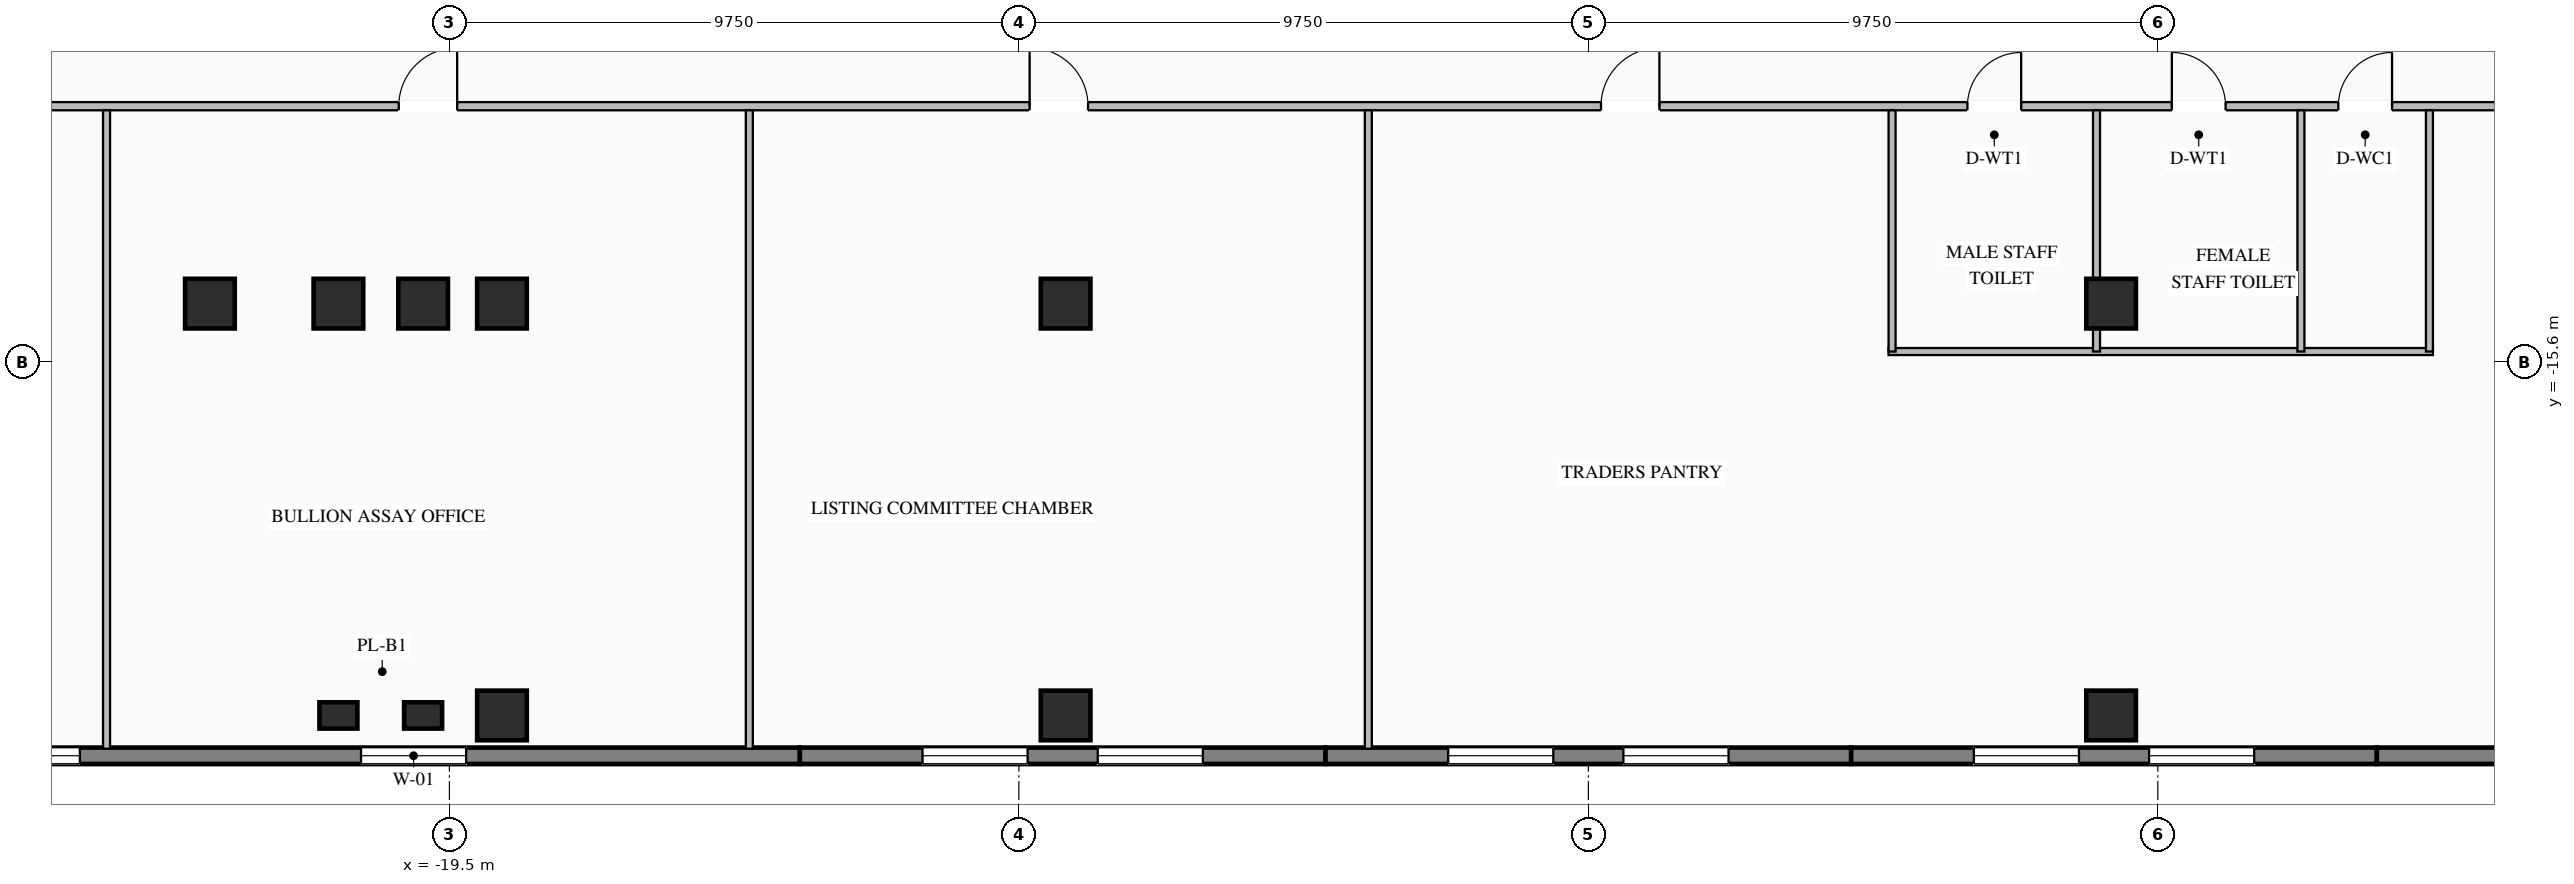
"""IFC4 building model, lengths in metres.
Left out: names, types, materials, properties, quantities, classifications, styles, units other than length and angle.
Written with IfcOpenShell. Run it as: python <this file> out.ifc"""

import sys

from ifc_helpers import new_model, si_unit, direction, frame, frame_2d, origin, origin_2d, place, context, subcontext, project, spatial, rectangle, i_section, extrude, element, fill, save


model = new_model("IFC4")
c1 = context("Model", 3, precision=1e-05, world=origin(), true_north=direction((0.0, 1.0)))
c2 = subcontext(c1, "Body", "Model", "MODEL_VIEW")
j1 = project(units=[si_unit("LENGTHUNIT", "METRE"), si_unit("PLANEANGLEUNIT", "RADIAN")], contexts=[c1])
p1 = place(None, origin())
s1 = spatial("IfcSite", under=j1, at=p1, CompositionType="ELEMENT")
p2 = place(p1, origin())
s2 = spatial("IfcBuilding", under=s1, at=p2, CompositionType="ELEMENT")
p3 = place(p2, frame((0.0, 0.0, 41.55)))
s3 = spatial("IfcBuildingStorey", under=s2, at=p3, CompositionType="ELEMENT", Elevation=41.55)
for number, where, z_axis, x_axis in (
    (1, (-21.4, -14.6, 0.0), (0.0, 0.0, 1.0), (1.0, 0.0, 0.0)),
    (2, (-19.95, -14.6, 0.0), (0.0, 0.0, 1.0), (1.0, 0.0, 0.0)),
    (3, (-18.6, -14.6, 0.0), (0.0, 0.0, 1.0), (1.0, 0.0, 0.0)),
    (4, (-8.95, -14.6, 0.0), (0.0, 0.0, 1.0), (1.0, 0.0, 0.0)),
    (5, (8.95, -14.6, 0.0), (0.0, 0.0, 1.0), (1.0, 0.0, 0.0)),
    (6, (-23.6, -14.6, 0.0), (0.0, 0.0, 1.0), (1.0, 0.0, 0.0)),
    (7, (-18.6, -21.65, 0.0), (0.0, 0.0, 1.0), (1.0, 0.0, 0.0)),
    (8, (-8.95, -21.65, 0.0), (0.0, 0.0, 1.0), (1.0, 0.0, 0.0)),
    (9, (8.95, -21.65, 0.0), (0.0, 0.0, 1.0), (1.0, 0.0, 0.0)),
):
    element("IfcColumn", number, at=place(p3, frame(where, z_axis=z_axis, x_axis=x_axis)), inside=s3, PredefinedType="COLUMN", context=c2, shape_type="SweptSolid", body=[
        extrude(i_section(OverallWidth=0.85, OverallDepth=0.85, WebThickness=0.032, FlangeThickness=0.048, at=origin_2d()), origin(), (0.0, 0.0, 1.0), 3.45),
    ])
for number, where, z_axis, x_axis in (
    (10, (-21.4, -21.65, 0.0), (0.0, 0.0, 1.0), (1.0, 0.0, 0.0)),
    (11, (-19.95, -21.65, 0.0), (0.0, 0.0, 1.0), (1.0, 0.0, 0.0)),
):
    element("IfcColumn", number, at=place(p3, frame(where, z_axis=z_axis, x_axis=x_axis)), inside=s3, PredefinedType="PILASTER", context=c2, shape_type="SweptSolid", body=[
        extrude(rectangle(XDim=0.65, YDim=0.45, at=origin_2d()), origin(), (0.0, 0.0, 1.0), 3.45),
    ])
p4 = place(p3, frame((-13.5, -22.34, 0.0), z_axis=(0.0, 0.0, 1.0), x_axis=(-1.0, 0.0, 0.0)))
e12 = element("IfcWall", 12, at=p4, inside=s3, PredefinedType="STANDARD", context=c2, shape_type="SweptSolid", body=[
    extrude(rectangle(XDim=19.84, YDim=0.28, at=frame_2d((9.92, 0.0))), origin(), (0.0, 0.0, 1.0), 3.25),
])
p5 = place(p4, frame((5.713, 0.0, 0.76)))
e13 = element("IfcOpeningElement", 13, at=p5, cuts=e12, PredefinedType="OPENING", context=c2, shape_type="SweptSolid", body=[
    extrude(rectangle(XDim=1.8, YDim=1.95, at=frame_2d((0.9, 0.975))), frame((0.0, 0.15, 0.0), z_axis=(0.0, -1.0, 0.0), x_axis=(1.0, 0.0, 0.0)), (0.0, 0.0, 1.0), 0.3),
])
p6 = place(p4, frame((12.327, 0.0, 0.76)))
e14 = element("IfcOpeningElement", 14, at=p6, cuts=e12, PredefinedType="OPENING", context=c2, shape_type="SweptSolid", body=[
    extrude(rectangle(XDim=1.8, YDim=1.95, at=frame_2d((0.9, 0.975))), frame((0.0, 0.15, 0.0), z_axis=(0.0, -1.0, 0.0), x_axis=(1.0, 0.0, 0.0)), (0.0, 0.0, 1.0), 0.3),
])
p7 = place(p3, frame((-4.5, -22.34, 0.0), z_axis=(0.0, 0.0, 1.0), x_axis=(-1.0, 0.0, 0.0)))
e15 = element("IfcWall", 15, at=p7, inside=s3, PredefinedType="STANDARD", context=c2, shape_type="SweptSolid", body=[
    extrude(rectangle(XDim=9.0, YDim=0.28, at=frame_2d((4.5, 0.0))), origin(), (0.0, 0.0, 1.0), 3.25),
])
p8 = place(p7, frame((2.1, 0.0, 0.76)))
e16 = element("IfcOpeningElement", 16, at=p8, cuts=e15, PredefinedType="OPENING", context=c2, shape_type="SweptSolid", body=[
    extrude(rectangle(XDim=1.8, YDim=1.95, at=frame_2d((0.9, 0.975))), frame((0.0, 0.15, 0.0), z_axis=(0.0, -1.0, 0.0), x_axis=(1.0, 0.0, 0.0)), (0.0, 0.0, 1.0), 0.3),
])
p9 = place(p7, frame((5.1, 0.0, 0.76)))
e17 = element("IfcOpeningElement", 17, at=p9, cuts=e15, PredefinedType="OPENING", context=c2, shape_type="SweptSolid", body=[
    extrude(rectangle(XDim=1.8, YDim=1.95, at=frame_2d((0.9, 0.975))), frame((0.0, 0.15, 0.0), z_axis=(0.0, -1.0, 0.0), x_axis=(1.0, 0.0, 0.0)), (0.0, 0.0, 1.0), 0.3),
])
p10 = place(p3, frame((4.5, -22.34, 0.0), z_axis=(0.0, 0.0, 1.0), x_axis=(-1.0, 0.0, 0.0)))
e18 = element("IfcWall", 18, at=p10, inside=s3, PredefinedType="STANDARD", context=c2, shape_type="SweptSolid", body=[
    extrude(rectangle(XDim=9.0, YDim=0.28, at=frame_2d((4.5, 0.0))), origin(), (0.0, 0.0, 1.0), 3.25),
])
p11 = place(p10, frame((2.1, 0.0, 0.76)))
e19 = element("IfcOpeningElement", 19, at=p11, cuts=e18, PredefinedType="OPENING", context=c2, shape_type="SweptSolid", body=[
    extrude(rectangle(XDim=1.8, YDim=1.95, at=frame_2d((0.9, 0.975))), frame((0.0, 0.15, 0.0), z_axis=(0.0, -1.0, 0.0), x_axis=(1.0, 0.0, 0.0)), (0.0, 0.0, 1.0), 0.3),
])
p12 = place(p10, frame((5.1, 0.0, 0.76)))
e20 = element("IfcOpeningElement", 20, at=p12, cuts=e18, PredefinedType="OPENING", context=c2, shape_type="SweptSolid", body=[
    extrude(rectangle(XDim=1.8, YDim=1.95, at=frame_2d((0.9, 0.975))), frame((0.0, 0.15, 0.0), z_axis=(0.0, -1.0, 0.0), x_axis=(1.0, 0.0, 0.0)), (0.0, 0.0, 1.0), 0.3),
])
p13 = place(p3, frame((13.5, -22.34, 0.0), z_axis=(0.0, 0.0, 1.0), x_axis=(-1.0, 0.0, 0.0)))
e21 = element("IfcWall", 21, at=p13, inside=s3, PredefinedType="STANDARD", context=c2, shape_type="SweptSolid", body=[
    extrude(rectangle(XDim=9.0, YDim=0.28, at=frame_2d((4.5, 0.0))), origin(), (0.0, 0.0, 1.0), 3.25),
])
p14 = place(p13, frame((2.1, 0.0, 0.76)))
e22 = element("IfcOpeningElement", 22, at=p14, cuts=e21, PredefinedType="OPENING", context=c2, shape_type="SweptSolid", body=[
    extrude(rectangle(XDim=1.8, YDim=1.95, at=frame_2d((0.9, 0.975))), frame((0.0, 0.15, 0.0), z_axis=(0.0, -1.0, 0.0), x_axis=(1.0, 0.0, 0.0)), (0.0, 0.0, 1.0), 0.3),
])
p15 = place(p13, frame((5.1, 0.0, 0.76)))
e23 = element("IfcOpeningElement", 23, at=p15, cuts=e21, PredefinedType="OPENING", context=c2, shape_type="SweptSolid", body=[
    extrude(rectangle(XDim=1.8, YDim=1.95, at=frame_2d((0.9, 0.975))), frame((0.0, 0.15, 0.0), z_axis=(0.0, -1.0, 0.0), x_axis=(1.0, 0.0, 0.0)), (0.0, 0.0, 1.0), 0.3),
])
p16 = place(p3, frame((33.34, -22.34, 0.0), z_axis=(0.0, 0.0, 1.0), x_axis=(-1.0, 0.0, 0.0)))
e24 = element("IfcWall", 24, at=p16, inside=s3, PredefinedType="STANDARD", context=c2, shape_type="SweptSolid", body=[
    extrude(rectangle(XDim=19.84, YDim=0.28, at=frame_2d((9.92, 0.0))), origin(), (0.0, 0.0, 1.0), 3.25),
])
p17 = place(p16, frame((5.713, 0.0, 0.76)))
e25 = element("IfcOpeningElement", 25, at=p17, cuts=e24, PredefinedType="OPENING", context=c2, shape_type="SweptSolid", body=[
    extrude(rectangle(XDim=1.8, YDim=1.95, at=frame_2d((0.9, 0.975))), frame((0.0, 0.15, 0.0), z_axis=(0.0, -1.0, 0.0), x_axis=(1.0, 0.0, 0.0)), (0.0, 0.0, 1.0), 0.3),
])
p18 = place(p16, frame((11.277, 0.0, 0.76)))
e26 = element("IfcOpeningElement", 26, at=p18, cuts=e24, PredefinedType="OPENING", context=c2, shape_type="SweptSolid", body=[
    extrude(rectangle(XDim=1.8, YDim=1.95, at=frame_2d((0.9, 0.975))), frame((0.0, 0.15, 0.0), z_axis=(0.0, -1.0, 0.0), x_axis=(1.0, 0.0, 0.0)), (0.0, 0.0, 1.0), 0.3),
])
p19 = place(p3, frame((-35.62, -11.22, 0.0), z_axis=(0.0, 0.0, 1.0), x_axis=(1.0, 0.0, 0.0)))
e27 = element("IfcWall", 27, at=p19, inside=s3, PredefinedType="STANDARD", context=c2, shape_type="SweptSolid", body=[
    extrude(rectangle(XDim=71.24, YDim=0.14, at=frame_2d((35.62, 0.0))), origin(), (0.0, 0.0, 1.0), 2.745),
])
p20 = place(p19, frame((42.11, 0.0, 0.0)))
e28 = element("IfcOpeningElement", 28, at=p20, cuts=e27, PredefinedType="OPENING", context=c2, shape_type="SweptSolid", body=[
    extrude(rectangle(XDim=0.92, YDim=2.08, at=frame_2d((0.46, 1.04))), frame((0.0, 0.08, 0.0), z_axis=(0.0, -1.0, 0.0), x_axis=(1.0, 0.0, 0.0)), (0.0, 0.0, 1.0), 0.16),
])
p21 = place(p19, frame((45.61, 0.0, 0.0)))
e29 = element("IfcOpeningElement", 29, at=p21, cuts=e27, PredefinedType="OPENING", context=c2, shape_type="SweptSolid", body=[
    extrude(rectangle(XDim=0.92, YDim=2.08, at=frame_2d((0.46, 1.04))), frame((0.0, 0.08, 0.0), z_axis=(0.0, -1.0, 0.0), x_axis=(1.0, 0.0, 0.0)), (0.0, 0.0, 1.0), 0.16),
])
p22 = place(p19, frame((48.46, 0.0, 0.0)))
e30 = element("IfcOpeningElement", 30, at=p22, cuts=e27, PredefinedType="OPENING", context=c2, shape_type="SweptSolid", body=[
    extrude(rectangle(XDim=0.92, YDim=2.08, at=frame_2d((0.46, 1.04))), frame((0.0, 0.08, 0.0), z_axis=(0.0, -1.0, 0.0), x_axis=(1.0, 0.0, 0.0)), (0.0, 0.0, 1.0), 0.16),
])
p23 = place(p19, frame((4.751, 0.0, 0.0)))
e31 = element("IfcOpeningElement", 31, at=p23, cuts=e27, PredefinedType="OPENING", context=c2, shape_type="SweptSolid", body=[
    extrude(rectangle(XDim=1.0, YDim=2.08, at=frame_2d((0.5, 1.04))), frame((0.0, 0.08, 0.0), z_axis=(0.0, -1.0, 0.0), x_axis=(1.0, 0.0, 0.0)), (0.0, 0.0, 1.0), 0.16),
])
p24 = place(p19, frame((15.252, 0.0, 0.0)))
e32 = element("IfcOpeningElement", 32, at=p24, cuts=e27, PredefinedType="OPENING", context=c2, shape_type="SweptSolid", body=[
    extrude(rectangle(XDim=1.0, YDim=2.08, at=frame_2d((0.5, 1.04))), frame((0.0, 0.08, 0.0), z_axis=(0.0, -1.0, 0.0), x_axis=(1.0, 0.0, 0.0)), (0.0, 0.0, 1.0), 0.16),
])
p25 = place(p19, frame((26.054, 0.0, 0.0)))
e33 = element("IfcOpeningElement", 33, at=p25, cuts=e27, PredefinedType="OPENING", context=c2, shape_type="SweptSolid", body=[
    extrude(rectangle(XDim=1.0, YDim=2.08, at=frame_2d((0.5, 1.04))), frame((0.0, 0.08, 0.0), z_axis=(0.0, -1.0, 0.0), x_axis=(1.0, 0.0, 0.0)), (0.0, 0.0, 1.0), 0.16),
])
p26 = place(p19, frame((35.836, 0.0, 0.0)))
e34 = element("IfcOpeningElement", 34, at=p26, cuts=e27, PredefinedType="OPENING", context=c2, shape_type="SweptSolid", body=[
    extrude(rectangle(XDim=1.0, YDim=2.08, at=frame_2d((0.5, 1.04))), frame((0.0, 0.08, 0.0), z_axis=(0.0, -1.0, 0.0), x_axis=(1.0, 0.0, 0.0)), (0.0, 0.0, 1.0), 0.16),
])
p27 = place(p19, frame((52.165, 0.0, 0.0)))
e35 = element("IfcOpeningElement", 35, at=p27, cuts=e27, PredefinedType="OPENING", context=c2, shape_type="SweptSolid", body=[
    extrude(rectangle(XDim=1.0, YDim=2.08, at=frame_2d((0.5, 1.04))), frame((0.0, 0.08, 0.0), z_axis=(0.0, -1.0, 0.0), x_axis=(1.0, 0.0, 0.0)), (0.0, 0.0, 1.0), 0.16),
])
p28 = place(p19, frame((57.667, 0.0, 0.0)))
e36 = element("IfcOpeningElement", 36, at=p28, cuts=e27, PredefinedType="OPENING", context=c2, shape_type="SweptSolid", body=[
    extrude(rectangle(XDim=1.0, YDim=2.08, at=frame_2d((0.5, 1.04))), frame((0.0, 0.08, 0.0), z_axis=(0.0, -1.0, 0.0), x_axis=(1.0, 0.0, 0.0)), (0.0, 0.0, 1.0), 0.16),
])
p29 = place(p19, frame((63.274, 0.0, 0.0)))
e37 = element("IfcOpeningElement", 37, at=p29, cuts=e27, PredefinedType="OPENING", context=c2, shape_type="SweptSolid", body=[
    extrude(rectangle(XDim=1.0, YDim=2.08, at=frame_2d((0.5, 1.04))), frame((0.0, 0.08, 0.0), z_axis=(0.0, -1.0, 0.0), x_axis=(1.0, 0.0, 0.0)), (0.0, 0.0, 1.0), 0.16),
])
p30 = place(p19, frame((68.257, 0.0, 0.0)))
e38 = element("IfcOpeningElement", 38, at=p30, cuts=e27, PredefinedType="OPENING", context=c2, shape_type="SweptSolid", body=[
    extrude(rectangle(XDim=1.0, YDim=2.08, at=frame_2d((0.5, 1.04))), frame((0.0, 0.08, 0.0), z_axis=(0.0, -1.0, 0.0), x_axis=(1.0, 0.0, 0.0)), (0.0, 0.0, 1.0), 0.16),
])
p31 = place(p3, frame((5.14, -15.42, 0.0), z_axis=(0.0, 0.0, 1.0), x_axis=(1.0, 0.0, 0.0)))
e39 = element("IfcWall", 39, at=p31, inside=s3, PredefinedType="STANDARD", context=c2, shape_type="SweptSolid", body=[
    extrude(rectangle(XDim=9.32, YDim=0.12, at=frame_2d((4.66, 0.0))), origin(), (0.0, 0.0, 1.0), 3.25),
])
for number, where, z_axis, x_axis in (
    (40, (5.2, -15.42, 0.0), (0.0, 0.0, 1.0), (0.0, 1.0, 0.0)),
    (41, (8.7, -15.42, 0.0), (0.0, 0.0, 1.0), (0.0, 1.0, 0.0)),
    (42, (12.2, -15.42, 0.0), (0.0, 0.0, 1.0), (0.0, 1.0, 0.0)),
    (43, (14.4, -15.42, 0.0), (0.0, 0.0, 1.0), (0.0, 1.0, 0.0)),
):
    element("IfcWall", number, at=place(p3, frame(where, z_axis=z_axis, x_axis=x_axis)), inside=s3, PredefinedType="STANDARD", context=c2, shape_type="SweptSolid", body=[
        extrude(rectangle(XDim=4.13, YDim=0.12, at=frame_2d((2.065, 0.0))), origin(), (0.0, 0.0, 1.0), 3.25),
    ])
for number, where, z_axis, x_axis in (
    (44, (-25.37, -22.22, 0.0), (0.0, 0.0, 1.0), (0.0, 1.0, 0.0)),
    (45, (-14.365, -22.22, 0.0), (0.0, 0.0, 1.0), (0.0, 1.0, 0.0)),
    (46, (-3.767, -22.22, 0.0), (0.0, 0.0, 1.0), (0.0, 1.0, 0.0)),
):
    element("IfcWall", number, at=place(p3, frame(where, z_axis=z_axis, x_axis=x_axis)), inside=s3, PredefinedType="STANDARD", context=c2, shape_type="SweptSolid", body=[
        extrude(rectangle(XDim=10.93, YDim=0.12, at=frame_2d((5.465, 0.0))), origin(), (0.0, 0.0, 1.0), 3.25),
    ])
p32 = place(p5, origin())
e47 = element("IfcWindow", 47, at=p32, inside=s3, PartitioningType="SINGLE_PANEL", PredefinedType="WINDOW", context=c2, shape_type="SweptSolid", body=[
    extrude(rectangle(XDim=1.8, YDim=1.95, at=frame_2d((0.9, 0.975))), frame((0.0, 0.03, 0.0), z_axis=(0.0, -1.0, 0.0), x_axis=(1.0, 0.0, 0.0)), (0.0, 0.0, 1.0), 0.06),
])
fill(e13, e47)
p33 = place(p6, origin())
e48 = element("IfcWindow", 48, at=p33, inside=s3, PartitioningType="SINGLE_PANEL", PredefinedType="WINDOW", context=c2, shape_type="SweptSolid", body=[
    extrude(rectangle(XDim=1.8, YDim=1.95, at=frame_2d((0.9, 0.975))), frame((0.0, 0.03, 0.0), z_axis=(0.0, -1.0, 0.0), x_axis=(1.0, 0.0, 0.0)), (0.0, 0.0, 1.0), 0.06),
])
fill(e14, e48)
p34 = place(p8, origin())
e49 = element("IfcWindow", 49, at=p34, inside=s3, PartitioningType="SINGLE_PANEL", PredefinedType="WINDOW", context=c2, shape_type="SweptSolid", body=[
    extrude(rectangle(XDim=1.8, YDim=1.95, at=frame_2d((0.9, 0.975))), frame((0.0, 0.03, 0.0), z_axis=(0.0, -1.0, 0.0), x_axis=(1.0, 0.0, 0.0)), (0.0, 0.0, 1.0), 0.06),
])
fill(e16, e49)
p35 = place(p9, origin())
e50 = element("IfcWindow", 50, at=p35, inside=s3, PartitioningType="SINGLE_PANEL", PredefinedType="WINDOW", context=c2, shape_type="SweptSolid", body=[
    extrude(rectangle(XDim=1.8, YDim=1.95, at=frame_2d((0.9, 0.975))), frame((0.0, 0.03, 0.0), z_axis=(0.0, -1.0, 0.0), x_axis=(1.0, 0.0, 0.0)), (0.0, 0.0, 1.0), 0.06),
])
fill(e17, e50)
p36 = place(p11, origin())
e51 = element("IfcWindow", 51, at=p36, inside=s3, PartitioningType="SINGLE_PANEL", PredefinedType="WINDOW", context=c2, shape_type="SweptSolid", body=[
    extrude(rectangle(XDim=1.8, YDim=1.95, at=frame_2d((0.9, 0.975))), frame((0.0, 0.03, 0.0), z_axis=(0.0, -1.0, 0.0), x_axis=(1.0, 0.0, 0.0)), (0.0, 0.0, 1.0), 0.06),
])
fill(e19, e51)
p37 = place(p12, origin())
e52 = element("IfcWindow", 52, at=p37, inside=s3, PartitioningType="SINGLE_PANEL", PredefinedType="WINDOW", context=c2, shape_type="SweptSolid", body=[
    extrude(rectangle(XDim=1.8, YDim=1.95, at=frame_2d((0.9, 0.975))), frame((0.0, 0.03, 0.0), z_axis=(0.0, -1.0, 0.0), x_axis=(1.0, 0.0, 0.0)), (0.0, 0.0, 1.0), 0.06),
])
fill(e20, e52)
p38 = place(p14, origin())
e53 = element("IfcWindow", 53, at=p38, inside=s3, PartitioningType="SINGLE_PANEL", PredefinedType="WINDOW", context=c2, shape_type="SweptSolid", body=[
    extrude(rectangle(XDim=1.8, YDim=1.95, at=frame_2d((0.9, 0.975))), frame((0.0, 0.03, 0.0), z_axis=(0.0, -1.0, 0.0), x_axis=(1.0, 0.0, 0.0)), (0.0, 0.0, 1.0), 0.06),
])
fill(e22, e53)
p39 = place(p15, origin())
e54 = element("IfcWindow", 54, at=p39, inside=s3, PartitioningType="SINGLE_PANEL", PredefinedType="WINDOW", context=c2, shape_type="SweptSolid", body=[
    extrude(rectangle(XDim=1.8, YDim=1.95, at=frame_2d((0.9, 0.975))), frame((0.0, 0.03, 0.0), z_axis=(0.0, -1.0, 0.0), x_axis=(1.0, 0.0, 0.0)), (0.0, 0.0, 1.0), 0.06),
])
fill(e23, e54)
p40 = place(p20, origin())
e55 = element("IfcDoor", 55, at=p40, inside=s3, OperationType="SINGLE_SWING_RIGHT", PredefinedType="DOOR", context=c2, shape_type="SweptSolid", body=[
    extrude(rectangle(XDim=0.92, YDim=2.08, at=frame_2d((0.46, 1.04))), frame((0.0, 0.025, 0.0), z_axis=(0.0, -1.0, 0.0), x_axis=(1.0, 0.0, 0.0)), (0.0, 0.0, 1.0), 0.05),
])
fill(e28, e55)
p41 = place(p21, origin())
e56 = element("IfcDoor", 56, at=p41, inside=s3, OperationType="SINGLE_SWING_LEFT", PredefinedType="DOOR", context=c2, shape_type="SweptSolid", body=[
    extrude(rectangle(XDim=0.92, YDim=2.08, at=frame_2d((0.46, 1.04))), frame((0.0, 0.025, 0.0), z_axis=(0.0, -1.0, 0.0), x_axis=(1.0, 0.0, 0.0)), (0.0, 0.0, 1.0), 0.05),
])
fill(e29, e56)
p42 = place(p22, origin())
e57 = element("IfcDoor", 57, at=p42, inside=s3, OperationType="SINGLE_SWING_RIGHT", PredefinedType="DOOR", context=c2, shape_type="SweptSolid", body=[
    extrude(rectangle(XDim=0.92, YDim=2.08, at=frame_2d((0.46, 1.04))), frame((0.0, 0.025, 0.0), z_axis=(0.0, -1.0, 0.0), x_axis=(1.0, 0.0, 0.0)), (0.0, 0.0, 1.0), 0.05),
])
fill(e30, e57)
p43 = place(p24, origin())
e58 = element("IfcDoor", 58, at=p43, inside=s3, OperationType="SINGLE_SWING_RIGHT", PredefinedType="DOOR", context=c2, shape_type="SweptSolid", body=[
    extrude(rectangle(XDim=1.0, YDim=2.08, at=frame_2d((0.5, 1.04))), frame((0.0, 0.025, 0.0), z_axis=(0.0, -1.0, 0.0), x_axis=(1.0, 0.0, 0.0)), (0.0, 0.0, 1.0), 0.05),
])
fill(e32, e58)
p44 = place(p25, origin())
e59 = element("IfcDoor", 59, at=p44, inside=s3, OperationType="SINGLE_SWING_LEFT", PredefinedType="DOOR", context=c2, shape_type="SweptSolid", body=[
    extrude(rectangle(XDim=1.0, YDim=2.08, at=frame_2d((0.5, 1.04))), frame((0.0, 0.025, 0.0), z_axis=(0.0, -1.0, 0.0), x_axis=(1.0, 0.0, 0.0)), (0.0, 0.0, 1.0), 0.05),
])
fill(e33, e59)
p45 = place(p26, origin())
e60 = element("IfcDoor", 60, at=p45, inside=s3, OperationType="SINGLE_SWING_RIGHT", PredefinedType="DOOR", context=c2, shape_type="SweptSolid", body=[
    extrude(rectangle(XDim=1.0, YDim=2.08, at=frame_2d((0.5, 1.04))), frame((0.0, 0.025, 0.0), z_axis=(0.0, -1.0, 0.0), x_axis=(1.0, 0.0, 0.0)), (0.0, 0.0, 1.0), 0.05),
])
fill(e34, e60)
save(model, sys.argv[1])
